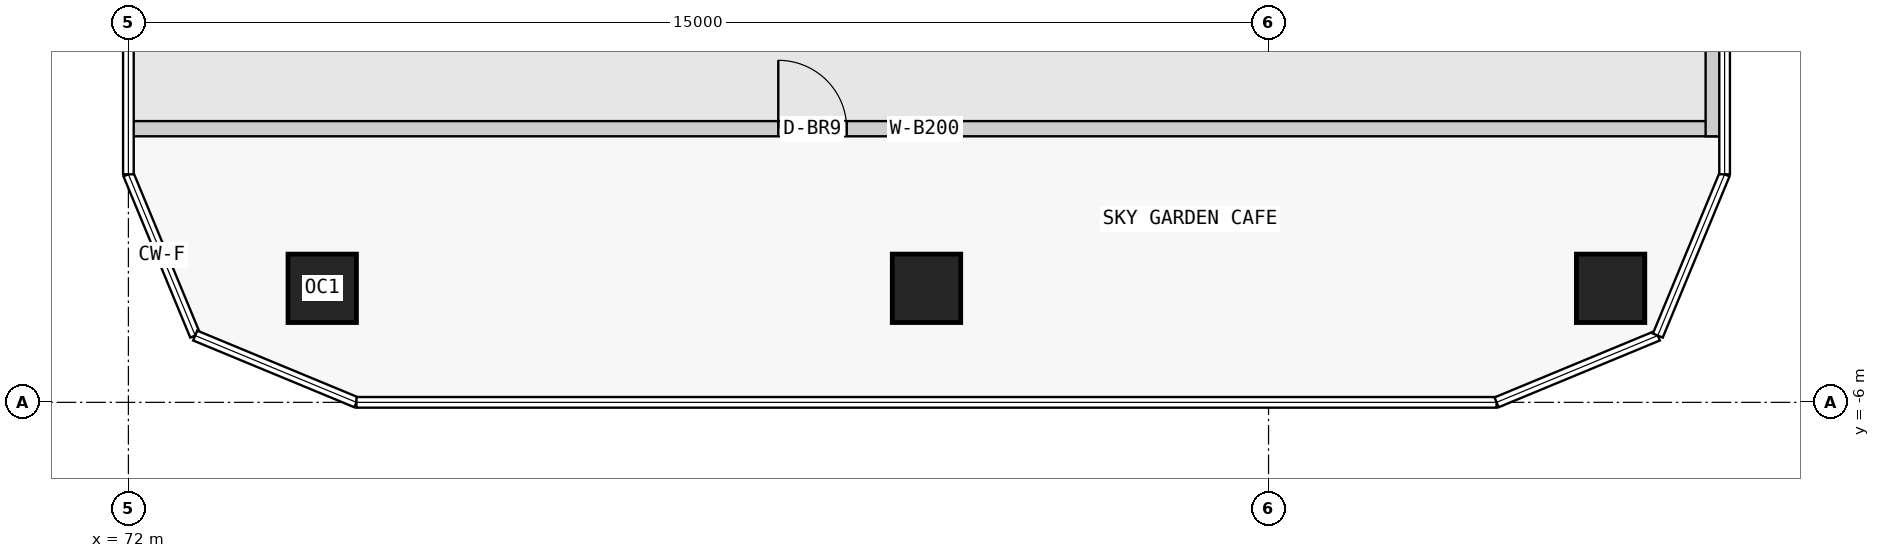
"""IFC4 building model, lengths in metres.
Left out: names, types, materials, properties, quantities, classifications, styles, units other than length and angle.
Written with IfcOpenShell. Run it as: python <this file> out.ifc"""

import sys

from ifc_helpers import new_model, si_unit, direction, frame, frame_2d, origin, origin_2d, place, context, subcontext, project, spatial, rectangle, extrude, element, fill, save


model = new_model("IFC4")
c1 = context("Model", 3, precision=1e-05, world=origin(), true_north=direction((0.0, 1.0)))
c2 = subcontext(c1, "Body", "Model", "MODEL_VIEW")
j1 = project(units=[si_unit("LENGTHUNIT", "METRE"), si_unit("PLANEANGLEUNIT", "RADIAN")], contexts=[c1])
p1 = place(None, origin())
s1 = spatial("IfcSite", under=j1, at=p1, CompositionType="ELEMENT")
p2 = place(p1, origin())
s2 = spatial("IfcBuilding", under=s1, at=p2, CompositionType="ELEMENT")
p3 = place(p2, frame((0.0, 0.0, 123.8)))
s3 = spatial("IfcBuildingStorey", under=s2, at=p3, CompositionType="ELEMENT", Elevation=123.8)
for number, where, z_axis, x_axis in (
    (1, (74.55, -4.5, 0.0), (0.0, 0.0, 1.0), (1.0, 0.0, 0.0)),
    (2, (82.5, -4.5, 0.0), (0.0, 0.0, 1.0), (1.0, 0.0, 0.0)),
    (3, (91.5, -4.5, 0.0), (0.0, 0.0, 1.0), (1.0, 0.0, 0.0)),
):
    element("IfcColumn", number, at=place(p3, frame(where, z_axis=z_axis, x_axis=x_axis)), inside=s3, PredefinedType="COLUMN", context=c2, shape_type="SweptSolid", body=[
        extrude(rectangle(XDim=0.9, YDim=0.9, at=origin_2d()), origin(), (0.0, 0.0, 1.0), 4.8),
    ])
p4 = place(p3, frame((72.0, -2.4, 0.0), z_axis=(0.0, 0.0, 1.0), x_axis=(1.0, 0.0, 0.0)))
e4 = element("IfcWall", 4, at=p4, inside=s3, PredefinedType="PARTITIONING", context=c2, shape_type="SweptSolid", body=[
    extrude(rectangle(XDim=20.95, YDim=0.2, at=frame_2d((10.475, 0.0))), origin(), (0.0, 0.0, 1.0), 4.5),
])
p5 = place(p4, frame((8.55, 0.0, 0.0)))
e5 = element("IfcOpeningElement", 5, at=p5, cuts=e4, PredefinedType="OPENING", context=c2, shape_type="SweptSolid", body=[
    extrude(rectangle(XDim=0.9, YDim=2.1, at=frame_2d((0.45, 1.05))), frame((0.0, 0.11, 0.0), z_axis=(0.0, -1.0, 0.0), x_axis=(1.0, 0.0, 0.0)), (0.0, 0.0, 1.0), 0.22),
])
p6 = place(p3, frame((92.85, -2.5, 0.0), z_axis=(0.0, 0.0, 1.0), x_axis=(0.0, 1.0, 0.0)))
e6 = element("IfcWall", 6, at=p6, inside=s3, PredefinedType="PARTITIONING", context=c2, shape_type="SweptSolid", body=[
    extrude(rectangle(XDim=23.0, YDim=0.2, at=frame_2d((11.5, 0.0))), origin(), (0.0, 0.0, 1.0), 4.5),
])
p7 = place(p5, origin())
e7 = element("IfcDoor", 7, at=p7, inside=s3, OperationType="SINGLE_SWING_LEFT", PredefinedType="DOOR", context=c2, shape_type="SweptSolid", body=[
    extrude(rectangle(XDim=0.9, YDim=2.1, at=frame_2d((0.45, 1.05))), frame((0.0, 0.025, 0.0), z_axis=(0.0, -1.0, 0.0), x_axis=(1.0, 0.0, 0.0)), (0.0, 0.0, 1.0), 0.05),
])
fill(e5, e7)
save(model, sys.argv[1])
